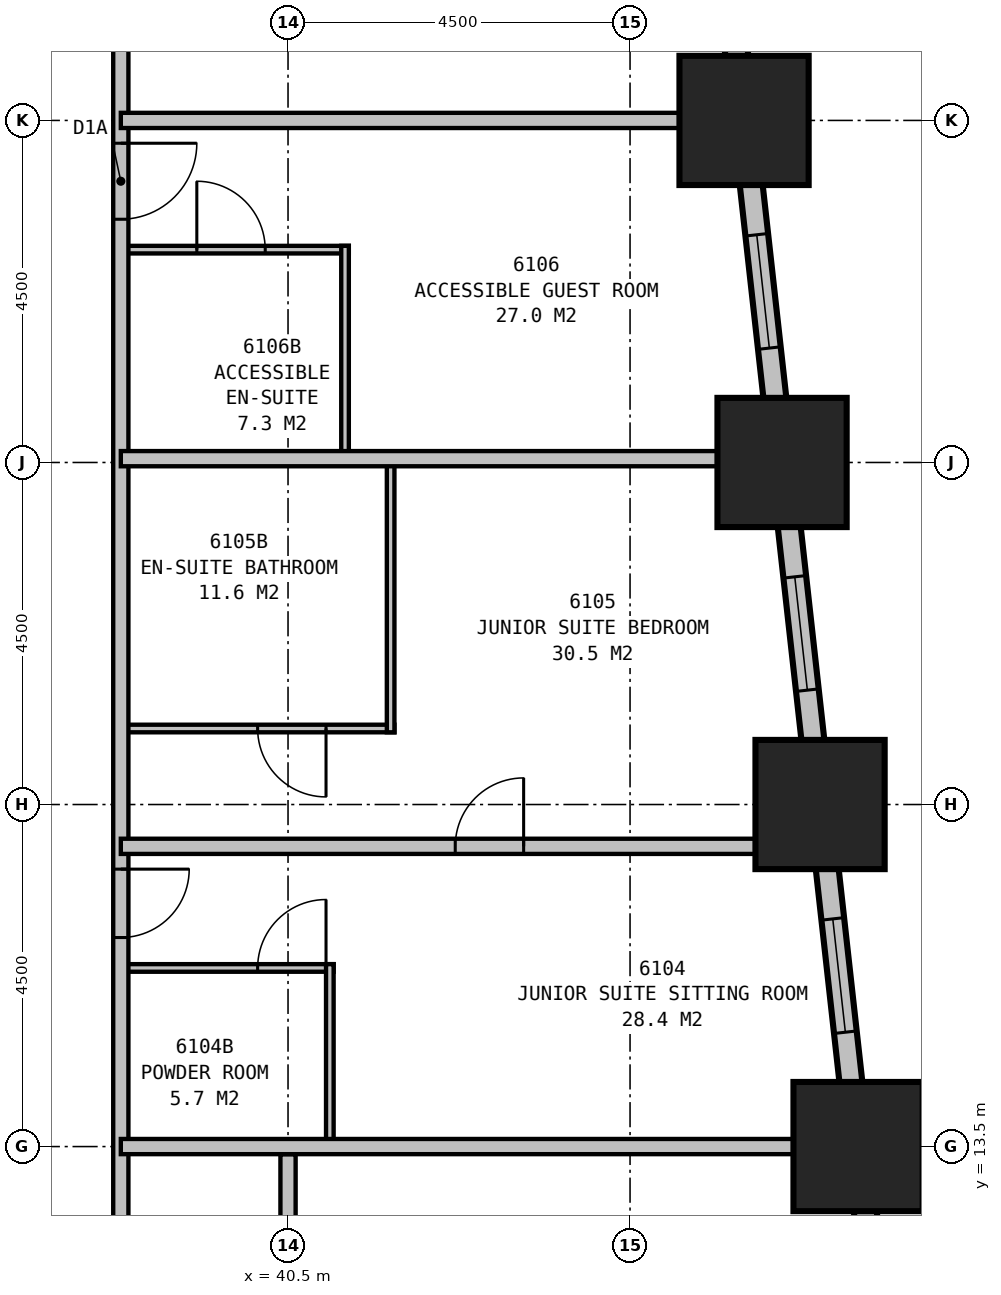
"""IFC4 building model, lengths in metres.
Left out: names, types, materials, properties, quantities, classifications, styles, units other than length and angle.
Written with IfcOpenShell. Run it as: python <this file> out.ifc"""

import sys

from ifc_helpers import new_model, si_unit, direction, frame, frame_2d, origin, origin_2d, place, context, subcontext, project, spatial, rectangle, extrude, element, fill, save


model = new_model("IFC4")
c1 = context("Model", 3, precision=1e-05, world=origin(), true_north=direction((0.0, 1.0)))
c2 = subcontext(c1, "Body", "Model", "MODEL_VIEW")
j1 = project(units=[si_unit("LENGTHUNIT", "METRE"), si_unit("PLANEANGLEUNIT", "RADIAN")], contexts=[c1])
p1 = place(None, origin())
s1 = spatial("IfcSite", under=j1, at=p1, CompositionType="ELEMENT")
p2 = place(p1, origin())
s2 = spatial("IfcBuilding", under=s1, at=p2, CompositionType="ELEMENT")
p3 = place(p2, frame((0.0, 0.0, 236.9)))
s3 = spatial("IfcBuildingStorey", under=s2, at=p3, CompositionType="ELEMENT", Elevation=236.9)
for number, where, z_axis, x_axis in (
    (1, (48.0, 13.5, 0.0), (0.0, 0.0, 1.0), (1.0, 0.0, 0.0)),
    (2, (47.5, 18.0, 0.0), (0.0, 0.0, 1.0), (1.0, 0.0, 0.0)),
    (3, (47.0, 22.5, 0.0), (0.0, 0.0, 1.0), (1.0, 0.0, 0.0)),
    (4, (46.5, 27.0, 0.0), (0.0, 0.0, 1.0), (1.0, 0.0, 0.0)),
):
    element("IfcColumn", number, at=place(p3, frame(where, z_axis=z_axis, x_axis=x_axis)), inside=s3, PredefinedType="COLUMN", context=c2, shape_type="SweptSolid", body=[
        extrude(rectangle(XDim=1.7, YDim=1.7, at=origin_2d()), origin(), (0.0, 0.0, 1.0), 3.9),
    ])
p4 = place(p3, frame((49.017, 4.351, 0.0), z_axis=(0.0, 0.0, 1.0), x_axis=(-0.110433201132, 0.993883548555, 0.0)))
e5 = element("IfcWall", 5, at=p4, inside=s3, PredefinedType="STANDARD", context=c2, shape_type="SweptSolid", body=[
    extrude(rectangle(XDim=31.994, YDim=0.3, at=frame_2d((15.997, 0.0))), origin(), (0.0, 0.0, 1.0), 2.5),
])
p5 = place(p4, frame((1.664, 0.0, 0.5)))
e6 = element("IfcOpeningElement", 6, at=p5, cuts=e5, PredefinedType="OPENING", context=c2, shape_type="SweptSolid", body=[
    extrude(rectangle(XDim=1.5, YDim=1.85, at=frame_2d((0.75, 0.925))), frame((0.0, 0.16, 0.0), z_axis=(0.0, -1.0, 0.0), x_axis=(1.0, 0.0, 0.0)), (0.0, 0.0, 1.0), 0.32),
])
p6 = place(p4, frame((6.192, 0.0, 0.5)))
e7 = element("IfcOpeningElement", 7, at=p6, cuts=e5, PredefinedType="OPENING", context=c2, shape_type="SweptSolid", body=[
    extrude(rectangle(XDim=1.5, YDim=1.85, at=frame_2d((0.75, 0.925))), frame((0.0, 0.16, 0.0), z_axis=(0.0, -1.0, 0.0), x_axis=(1.0, 0.0, 0.0)), (0.0, 0.0, 1.0), 0.32),
])
p7 = place(p4, frame((10.719, 0.0, 0.5)))
e8 = element("IfcOpeningElement", 8, at=p7, cuts=e5, PredefinedType="OPENING", context=c2, shape_type="SweptSolid", body=[
    extrude(rectangle(XDim=1.5, YDim=1.85, at=frame_2d((0.75, 0.925))), frame((0.0, 0.16, 0.0), z_axis=(0.0, -1.0, 0.0), x_axis=(1.0, 0.0, 0.0)), (0.0, 0.0, 1.0), 0.32),
])
p8 = place(p4, frame((15.247, 0.0, 0.5)))
e9 = element("IfcOpeningElement", 9, at=p8, cuts=e5, PredefinedType="OPENING", context=c2, shape_type="SweptSolid", body=[
    extrude(rectangle(XDim=1.5, YDim=1.85, at=frame_2d((0.75, 0.925))), frame((0.0, 0.16, 0.0), z_axis=(0.0, -1.0, 0.0), x_axis=(1.0, 0.0, 0.0)), (0.0, 0.0, 1.0), 0.32),
])
p9 = place(p4, frame((19.775, 0.0, 0.5)))
e10 = element("IfcOpeningElement", 10, at=p9, cuts=e5, PredefinedType="OPENING", context=c2, shape_type="SweptSolid", body=[
    extrude(rectangle(XDim=1.5, YDim=1.85, at=frame_2d((0.75, 0.925))), frame((0.0, 0.16, 0.0), z_axis=(0.0, -1.0, 0.0), x_axis=(1.0, 0.0, 0.0)), (0.0, 0.0, 1.0), 0.32),
])
p10 = place(p4, frame((24.302, 0.0, 0.5)))
e11 = element("IfcOpeningElement", 11, at=p10, cuts=e5, PredefinedType="OPENING", context=c2, shape_type="SweptSolid", body=[
    extrude(rectangle(XDim=1.5, YDim=1.85, at=frame_2d((0.75, 0.925))), frame((0.0, 0.16, 0.0), z_axis=(0.0, -1.0, 0.0), x_axis=(1.0, 0.0, 0.0)), (0.0, 0.0, 1.0), 0.32),
])
p11 = place(p4, frame((28.83, 0.0, 0.5)))
e12 = element("IfcOpeningElement", 12, at=p11, cuts=e5, PredefinedType="OPENING", context=c2, shape_type="SweptSolid", body=[
    extrude(rectangle(XDim=1.5, YDim=1.85, at=frame_2d((0.75, 0.925))), frame((0.0, 0.16, 0.0), z_axis=(0.0, -1.0, 0.0), x_axis=(1.0, 0.0, 0.0)), (0.0, 0.0, 1.0), 0.32),
])
p12 = place(p3, frame((38.3, 10.6, 0.0), z_axis=(0.0, 0.0, 1.0), x_axis=(0.0, 1.0, 0.0)))
e13 = element("IfcWall", 13, at=p12, inside=s3, PredefinedType="PARTITIONING", context=c2, shape_type="SweptSolid", body=[
    extrude(rectangle(XDim=18.7, YDim=0.2, at=frame_2d((9.35, 0.0))), origin(), (0.0, 0.0, 1.0), 3.65),
])
p13 = place(p12, frame((6.55, 0.0, 0.0), z_axis=(0.0, 0.0, 1.0), x_axis=(-1.0, 0.0, 0.0)))
e14 = element("IfcOpeningElement", 14, at=p13, cuts=e13, PredefinedType="OPENING", context=c2, shape_type="SweptSolid", body=[
    extrude(rectangle(XDim=0.9, YDim=2.1, at=frame_2d((0.45, 1.05))), frame((0.0, 0.11, 0.0), z_axis=(0.0, -1.0, 0.0), x_axis=(1.0, 0.0, 0.0)), (0.0, 0.0, 1.0), 0.22),
])
p14 = place(p12, frame((16.1, 0.0, 0.0), z_axis=(0.0, 0.0, 1.0), x_axis=(-1.0, 0.0, 0.0)))
e15 = element("IfcOpeningElement", 15, at=p14, cuts=e13, PredefinedType="OPENING", context=c2, shape_type="SweptSolid", body=[
    extrude(rectangle(XDim=1.0, YDim=2.1, at=frame_2d((0.5, 1.05))), frame((0.0, 0.11, 0.0), z_axis=(0.0, -1.0, 0.0), x_axis=(1.0, 0.0, 0.0)), (0.0, 0.0, 1.0), 0.22),
])
p15 = place(p3, frame((38.3, 17.45, 0.0), z_axis=(0.0, 0.0, 1.0), x_axis=(1.0, 0.0, 0.0)))
e16 = element("IfcWall", 16, at=p15, inside=s3, PredefinedType="PARTITIONING", context=c2, shape_type="SweptSolid", body=[
    extrude(rectangle(XDim=9.26, YDim=0.2, at=frame_2d((4.63, 0.0))), origin(), (0.0, 0.0, 1.0), 3.65),
])
p16 = place(p15, frame((4.4, 0.0, 0.0)))
e17 = element("IfcOpeningElement", 17, at=p16, cuts=e16, PredefinedType="OPENING", context=c2, shape_type="SweptSolid", body=[
    extrude(rectangle(XDim=0.9, YDim=2.1, at=frame_2d((0.45, 1.05))), frame((0.0, 0.11, 0.0), z_axis=(0.0, -1.0, 0.0), x_axis=(1.0, 0.0, 0.0)), (0.0, 0.0, 1.0), 0.22),
])
p17 = place(p3, frame((38.3, 22.55, 0.0), z_axis=(0.0, 0.0, 1.0), x_axis=(1.0, 0.0, 0.0)))
e18 = element("IfcWall", 18, at=p17, inside=s3, PredefinedType="PARTITIONING", context=c2, shape_type="SweptSolid", body=[
    extrude(rectangle(XDim=8.693, YDim=0.2, at=frame_2d((4.347, 0.0))), origin(), (0.0, 0.0, 1.0), 2.65),
])
p18 = place(p3, frame((41.05, 13.5, 0.0), z_axis=(0.0, 0.0, 1.0), x_axis=(0.0, 1.0, 0.0)))
e19 = element("IfcWall", 19, at=p18, inside=s3, PredefinedType="PLUMBINGWALL", context=c2, shape_type="SweptSolid", body=[
    extrude(rectangle(XDim=2.4, YDim=0.1, at=frame_2d((1.2, 0.0))), origin(), (0.0, 0.0, 1.0), 3.65),
])
p19 = place(p3, frame((38.3, 15.85, 0.0), z_axis=(0.0, 0.0, 1.0), x_axis=(1.0, 0.0, 0.0)))
e20 = element("IfcWall", 20, at=p19, inside=s3, PredefinedType="PLUMBINGWALL", context=c2, shape_type="SweptSolid", body=[
    extrude(rectangle(XDim=2.8, YDim=0.1, at=frame_2d((1.4, 0.0))), origin(), (0.0, 0.0, 1.0), 3.65),
])
p20 = place(p19, frame((1.8, 0.0, 0.0)))
e21 = element("IfcOpeningElement", 21, at=p20, cuts=e20, PredefinedType="OPENING", context=c2, shape_type="SweptSolid", body=[
    extrude(rectangle(XDim=0.9, YDim=2.1, at=frame_2d((0.45, 1.05))), frame((0.0, 0.06, 0.0), z_axis=(0.0, -1.0, 0.0), x_axis=(1.0, 0.0, 0.0)), (0.0, 0.0, 1.0), 0.12),
])
p21 = place(p3, frame((41.85, 18.95, 0.0), z_axis=(0.0, 0.0, 1.0), x_axis=(0.0, 1.0, 0.0)))
e22 = element("IfcWall", 22, at=p21, inside=s3, PredefinedType="PLUMBINGWALL", context=c2, shape_type="SweptSolid", body=[
    extrude(rectangle(XDim=3.6, YDim=0.1, at=frame_2d((1.8, 0.0))), origin(), (0.0, 0.0, 1.0), 3.65),
])
p22 = place(p3, frame((38.3, 19.0, 0.0), z_axis=(0.0, 0.0, 1.0), x_axis=(1.0, 0.0, 0.0)))
e23 = element("IfcWall", 23, at=p22, inside=s3, PredefinedType="PLUMBINGWALL", context=c2, shape_type="SweptSolid", body=[
    extrude(rectangle(XDim=3.6, YDim=0.1, at=frame_2d((1.8, 0.0))), origin(), (0.0, 0.0, 1.0), 3.65),
])
p23 = place(p22, frame((2.7, 0.0, 0.0), z_axis=(0.0, 0.0, 1.0), x_axis=(-1.0, 0.0, 0.0)))
e24 = element("IfcOpeningElement", 24, at=p23, cuts=e23, PredefinedType="OPENING", context=c2, shape_type="SweptSolid", body=[
    extrude(rectangle(XDim=0.9, YDim=2.1, at=frame_2d((0.45, 1.05))), frame((0.0, 0.06, 0.0), z_axis=(0.0, -1.0, 0.0), x_axis=(1.0, 0.0, 0.0)), (0.0, 0.0, 1.0), 0.12),
])
p24 = place(p3, frame((41.25, 22.55, 0.0), z_axis=(0.0, 0.0, 1.0), x_axis=(0.0, 1.0, 0.0)))
e25 = element("IfcWall", 25, at=p24, inside=s3, PredefinedType="PLUMBINGWALL", context=c2, shape_type="SweptSolid", body=[
    extrude(rectangle(XDim=2.8, YDim=0.1, at=frame_2d((1.4, 0.0))), origin(), (0.0, 0.0, 1.0), 3.65),
])
p25 = place(p3, frame((38.3, 25.3, 0.0), z_axis=(0.0, 0.0, 1.0), x_axis=(1.0, 0.0, 0.0)))
e26 = element("IfcWall", 26, at=p25, inside=s3, PredefinedType="PLUMBINGWALL", context=c2, shape_type="SweptSolid", body=[
    extrude(rectangle(XDim=3.0, YDim=0.1, at=frame_2d((1.5, 0.0))), origin(), (0.0, 0.0, 1.0), 3.65),
])
p26 = place(p25, frame((1.0, 0.0, 0.0)))
e27 = element("IfcOpeningElement", 27, at=p26, cuts=e26, PredefinedType="OPENING", context=c2, shape_type="SweptSolid", body=[
    extrude(rectangle(XDim=0.9, YDim=2.1, at=frame_2d((0.45, 1.05))), frame((0.0, 0.06, 0.0), z_axis=(0.0, -1.0, 0.0), x_axis=(1.0, 0.0, 0.0)), (0.0, 0.0, 1.0), 0.12),
])
p27 = place(p3, frame((38.3, 13.5, 0.0), z_axis=(0.0, 0.0, 1.0), x_axis=(1.0, 0.0, 0.0)))
e28 = element("IfcWall", 28, at=p27, inside=s3, PredefinedType="PARTITIONING", context=c2, shape_type="SweptSolid", body=[
    extrude(rectangle(XDim=9.921, YDim=0.2, at=frame_2d((4.96, 0.0))), origin(), (0.0, 0.0, 1.0), 2.35),
])
p28 = place(p3, frame((40.5, 4.6, 0.0), z_axis=(0.0, 0.0, 1.0), x_axis=(0.0, 1.0, 0.0)))
e29 = element("IfcWall", 29, at=p28, inside=s3, PredefinedType="PARTITIONING", context=c2, shape_type="SweptSolid", body=[
    extrude(rectangle(XDim=8.8, YDim=0.2, at=frame_2d((4.4, 0.0))), origin(), (0.0, 0.0, 1.0), 2.65),
])
p29 = place(p28, frame((4.05, 0.0, 0.0)))
e30 = element("IfcOpeningElement", 30, at=p29, cuts=e29, PredefinedType="OPENING", context=c2, shape_type="SweptSolid", body=[
    extrude(rectangle(XDim=0.9, YDim=2.1, at=frame_2d((0.45, 1.05))), frame((0.0, 0.11, 0.0), z_axis=(0.0, -1.0, 0.0), x_axis=(1.0, 0.0, 0.0)), (0.0, 0.0, 1.0), 0.22),
])
p30 = place(p3, frame((38.3, 27.0, 0.0), z_axis=(0.0, 0.0, 1.0), x_axis=(1.0, 0.0, 0.0)))
e31 = element("IfcWall", 31, at=p30, inside=s3, PredefinedType="PARTITIONING", context=c2, shape_type="SweptSolid", body=[
    extrude(rectangle(XDim=7.977, YDim=0.2, at=frame_2d((3.988, 0.0))), origin(), (0.0, 0.0, 1.0), 2.35),
])
p31 = place(p7, origin())
e32 = element("IfcWindow", 32, at=p31, inside=s3, PartitioningType="SINGLE_PANEL", PredefinedType="WINDOW", context=c2, shape_type="SweptSolid", body=[
    extrude(rectangle(XDim=1.5, YDim=1.85, at=frame_2d((0.75, 0.925))), frame((0.0, 0.03, 0.0), z_axis=(0.0, -1.0, 0.0), x_axis=(1.0, 0.0, 0.0)), (0.0, 0.0, 1.0), 0.06),
])
fill(e8, e32)
p32 = place(p8, origin())
e33 = element("IfcWindow", 33, at=p32, inside=s3, PartitioningType="SINGLE_PANEL", PredefinedType="WINDOW", context=c2, shape_type="SweptSolid", body=[
    extrude(rectangle(XDim=1.5, YDim=1.85, at=frame_2d((0.75, 0.925))), frame((0.0, 0.03, 0.0), z_axis=(0.0, -1.0, 0.0), x_axis=(1.0, 0.0, 0.0)), (0.0, 0.0, 1.0), 0.06),
])
fill(e9, e33)
p33 = place(p9, origin())
e34 = element("IfcWindow", 34, at=p33, inside=s3, PartitioningType="SINGLE_PANEL", PredefinedType="WINDOW", context=c2, shape_type="SweptSolid", body=[
    extrude(rectangle(XDim=1.5, YDim=1.85, at=frame_2d((0.75, 0.925))), frame((0.0, 0.03, 0.0), z_axis=(0.0, -1.0, 0.0), x_axis=(1.0, 0.0, 0.0)), (0.0, 0.0, 1.0), 0.06),
])
fill(e10, e34)
p34 = place(p13, origin())
e35 = element("IfcDoor", 35, at=p34, inside=s3, OperationType="SINGLE_SWING_LEFT", PredefinedType="DOOR", context=c2, shape_type="SweptSolid", body=[
    extrude(rectangle(XDim=0.9, YDim=2.1, at=frame_2d((0.45, 1.05))), frame((0.0, 0.025, 0.0), z_axis=(0.0, -1.0, 0.0), x_axis=(1.0, 0.0, 0.0)), (0.0, 0.0, 1.0), 0.05),
])
fill(e14, e35)
p35 = place(p14, origin())
e36 = element("IfcDoor", 36, at=p35, inside=s3, OperationType="SINGLE_SWING_LEFT", PredefinedType="DOOR", context=c2, shape_type="SweptSolid", body=[
    extrude(rectangle(XDim=1.0, YDim=2.1, at=frame_2d((0.5, 1.05))), frame((0.0, 0.025, 0.0), z_axis=(0.0, -1.0, 0.0), x_axis=(1.0, 0.0, 0.0)), (0.0, 0.0, 1.0), 0.05),
])
fill(e15, e36)
p36 = place(p16, origin())
e37 = element("IfcDoor", 37, at=p36, inside=s3, OperationType="SINGLE_SWING_RIGHT", PredefinedType="DOOR", context=c2, shape_type="SweptSolid", body=[
    extrude(rectangle(XDim=0.9, YDim=2.1, at=frame_2d((0.45, 1.05))), frame((0.0, 0.025, 0.0), z_axis=(0.0, -1.0, 0.0), x_axis=(1.0, 0.0, 0.0)), (0.0, 0.0, 1.0), 0.05),
])
fill(e17, e37)
p37 = place(p20, origin())
e38 = element("IfcDoor", 38, at=p37, inside=s3, OperationType="SINGLE_SWING_RIGHT", PredefinedType="DOOR", context=c2, shape_type="SweptSolid", body=[
    extrude(rectangle(XDim=0.9, YDim=2.1, at=frame_2d((0.45, 1.05))), frame((0.0, 0.025, 0.0), z_axis=(0.0, -1.0, 0.0), x_axis=(1.0, 0.0, 0.0)), (0.0, 0.0, 1.0), 0.05),
])
fill(e21, e38)
p38 = place(p23, origin())
e39 = element("IfcDoor", 39, at=p38, inside=s3, OperationType="SINGLE_SWING_LEFT", PredefinedType="DOOR", context=c2, shape_type="SweptSolid", body=[
    extrude(rectangle(XDim=0.9, YDim=2.1, at=frame_2d((0.45, 1.05))), frame((0.0, 0.025, 0.0), z_axis=(0.0, -1.0, 0.0), x_axis=(1.0, 0.0, 0.0)), (0.0, 0.0, 1.0), 0.05),
])
fill(e24, e39)
p39 = place(p26, origin())
e40 = element("IfcDoor", 40, at=p39, inside=s3, OperationType="SINGLE_SWING_LEFT", PredefinedType="DOOR", context=c2, shape_type="SweptSolid", body=[
    extrude(rectangle(XDim=0.9, YDim=2.1, at=frame_2d((0.45, 1.05))), frame((0.0, 0.025, 0.0), z_axis=(0.0, -1.0, 0.0), x_axis=(1.0, 0.0, 0.0)), (0.0, 0.0, 1.0), 0.05),
])
fill(e27, e40)
save(model, sys.argv[1])
